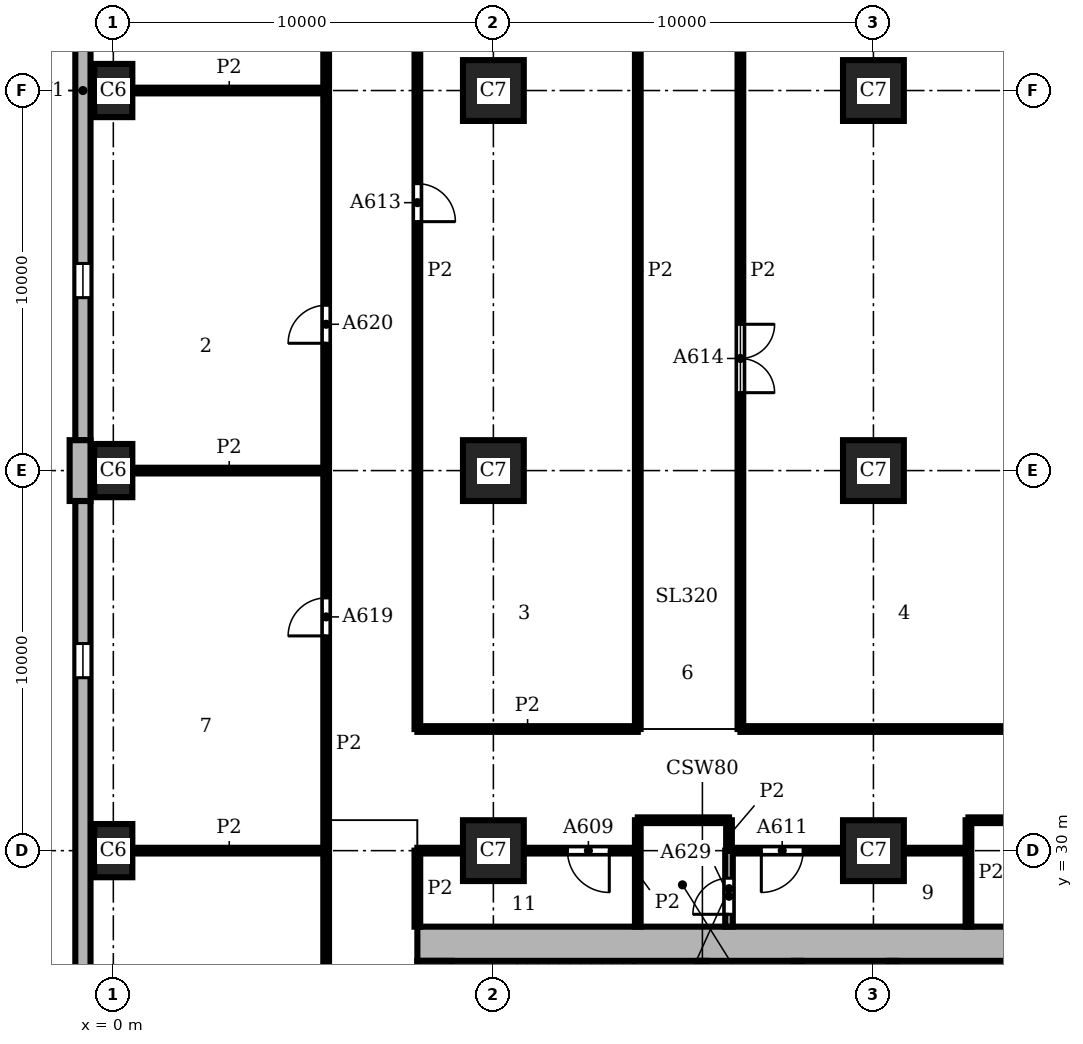
"""IFC4 building model, lengths in metres.
Left out: names, types, materials, properties, quantities, classifications, styles, units other than length and angle.
Written with IfcOpenShell. Run it as: python <this file> out.ifc"""

import sys

from ifc_helpers import new_model, si_unit, direction, frame, frame_2d, origin, origin_2d, place, context, subcontext, project, spatial, polyline, rectangle, outline, extrude, element, fill, save


model = new_model("IFC4")
c1 = context("Model", 3, precision=1e-05, world=origin(), true_north=direction((0.0, 1.0)))
c2 = subcontext(c1, "Body", "Model", "MODEL_VIEW")
j1 = project(units=[si_unit("LENGTHUNIT", "METRE"), si_unit("PLANEANGLEUNIT", "RADIAN")], contexts=[c1])
p1 = place(None, origin())
s1 = spatial("IfcSite", under=j1, at=p1, CompositionType="ELEMENT")
p2 = place(p1, origin())
s2 = spatial("IfcBuilding", under=s1, at=p2, CompositionType="ELEMENT")
p3 = place(p2, frame((0.0, 0.0, 70.5)))
s3 = spatial("IfcBuildingStorey", under=s2, at=p3, CompositionType="ELEMENT", Elevation=70.5)
for number, where, z_axis, x_axis in (
    (1, (0.0, 50.0, 0.0), (0.0, 0.0, 1.0), (0.0, 1.0, 0.0)),
    (2, (0.0, 40.0, 0.0), (0.0, 0.0, 1.0), (0.0, 1.0, 0.0)),
    (3, (0.0, 30.0, 0.0), (0.0, 0.0, 1.0), (0.0, 1.0, 0.0)),
):
    element("IfcColumn", number, at=place(p3, frame(where, z_axis=z_axis, x_axis=x_axis)), inside=s3, PredefinedType="COLUMN", context=c2, shape_type="SweptSolid", body=[
        extrude(rectangle(XDim=1.4, YDim=1.0, at=origin_2d()), origin(), (0.0, 0.0, 1.0), 3.9),
    ])
for number, where, z_axis, x_axis in (
    (4, (10.0, 30.0, 0.0), (0.0, 0.0, 1.0), (1.0, 0.0, 0.0)),
    (5, (10.0, 40.0, 0.0), (0.0, 0.0, 1.0), (1.0, 0.0, 0.0)),
    (6, (10.0, 50.0, 0.0), (0.0, 0.0, 1.0), (1.0, 0.0, 0.0)),
    (7, (20.0, 30.0, 0.0), (0.0, 0.0, 1.0), (1.0, 0.0, 0.0)),
    (8, (20.0, 40.0, 0.0), (0.0, 0.0, 1.0), (1.0, 0.0, 0.0)),
    (9, (20.0, 50.0, 0.0), (0.0, 0.0, 1.0), (1.0, 0.0, 0.0)),
):
    element("IfcColumn", number, at=place(p3, frame(where, z_axis=z_axis, x_axis=x_axis)), inside=s3, PredefinedType="COLUMN", context=c2, shape_type="SweptSolid", body=[
        extrude(rectangle(XDim=1.6, YDim=1.6, at=origin_2d()), origin(), (0.0, 0.0, 1.0), 3.9),
    ])
p4 = place(p3, frame((28.0, 27.55, 0.0), z_axis=(0.0, 0.0, 1.0), x_axis=(-1.0, 0.0, 0.0)))
e10 = element("IfcWall", 10, at=p4, inside=s3, PredefinedType="SHEAR", context=c2, shape_type="SweptSolid", body=[
    extrude(rectangle(XDim=20.0, YDim=0.9, at=frame_2d((10.0, 0.0))), origin(), (0.0, 0.0, 1.0), 3.9),
])
p5 = place(p3, frame((8.45, 27.1, 0.0), z_axis=(0.0, 0.0, 1.0), x_axis=(0.0, -1.0, 0.0)))
e11 = element("IfcWall", 11, at=p5, inside=s3, PredefinedType="SHEAR", context=c2, shape_type="SweptSolid", body=[
    extrude(rectangle(XDim=18.2, YDim=0.9, at=frame_2d((9.1, 0.0))), origin(), (0.0, 0.0, 1.0), 3.9),
])
p6 = place(p3, origin())
e12 = element("IfcWall", 12, at=p6, inside=s3, PredefinedType="SOLIDWALL", context=c2, shape_type="SweptSolid", body=[
    extrude(outline(polyline([(-1.0, 40.8), (-1.15, 40.8), (-1.15, 40.0), (-1.15, 39.2), (-1.0, 39.2), (-0.6, 39.2), (-0.6, 40.0), (-0.6, 40.8), (-1.0, 40.8)])), origin(), (0.0, 0.0, 1.0), 3.9),
])
p7 = place(p3, frame((-0.8, 59.2, 0.0), z_axis=(0.0, 0.0, 1.0), x_axis=(0.0, -1.0, 0.0)))
e13 = element("IfcWall", 13, at=p7, inside=s3, PredefinedType="SOLIDWALL", context=c2, shape_type="SweptSolid", body=[
    extrude(rectangle(XDim=18.4, YDim=0.4, at=frame_2d((9.2, 0.0))), origin(), (0.0, 0.0, 1.0), 3.9),
])
p8 = place(p7, frame((3.75, 0.0, 0.9)))
e14 = element("IfcOpeningElement", 14, at=p8, cuts=e13, PredefinedType="OPENING", context=c2, shape_type="SweptSolid", body=[
    extrude(rectangle(XDim=0.9, YDim=2.35, at=frame_2d((0.45, 1.175))), frame((0.0, 0.21, 0.0), z_axis=(0.0, -1.0, 0.0), x_axis=(1.0, 0.0, 0.0)), (0.0, 0.0, 1.0), 0.42),
])
p9 = place(p7, frame((13.75, 0.0, 0.9)))
e15 = element("IfcOpeningElement", 15, at=p9, cuts=e13, PredefinedType="OPENING", context=c2, shape_type="SweptSolid", body=[
    extrude(rectangle(XDim=0.9, YDim=2.35, at=frame_2d((0.45, 1.175))), frame((0.0, 0.21, 0.0), z_axis=(0.0, -1.0, 0.0), x_axis=(1.0, 0.0, 0.0)), (0.0, 0.0, 1.0), 0.42),
])
p10 = place(p3, frame((-0.8, 39.2, 0.0), z_axis=(0.0, 0.0, 1.0), x_axis=(0.0, -1.0, 0.0)))
e16 = element("IfcWall", 16, at=p10, inside=s3, PredefinedType="SOLIDWALL", context=c2, shape_type="SweptSolid", body=[
    extrude(rectangle(XDim=18.4, YDim=0.4, at=frame_2d((9.2, 0.0))), origin(), (0.0, 0.0, 1.0), 3.9),
])
p11 = place(p10, frame((3.75, 0.0, 0.9)))
e17 = element("IfcOpeningElement", 17, at=p11, cuts=e16, PredefinedType="OPENING", context=c2, shape_type="SweptSolid", body=[
    extrude(rectangle(XDim=0.9, YDim=2.35, at=frame_2d((0.45, 1.175))), frame((0.0, 0.21, 0.0), z_axis=(0.0, -1.0, 0.0), x_axis=(1.0, 0.0, 0.0)), (0.0, 0.0, 1.0), 0.42),
])
p12 = place(p10, frame((13.75, 0.0, 0.9)))
e18 = element("IfcOpeningElement", 18, at=p12, cuts=e16, PredefinedType="OPENING", context=c2, shape_type="SweptSolid", body=[
    extrude(rectangle(XDim=0.9, YDim=2.35, at=frame_2d((0.45, 1.175))), frame((0.0, 0.21, 0.0), z_axis=(0.0, -1.0, 0.0), x_axis=(1.0, 0.0, 0.0)), (0.0, 0.0, 1.0), 0.42),
])
p13 = place(p3, frame((15.5, 23.6, 0.0), z_axis=(0.0, 0.0, 1.0), x_axis=(0.0, 1.0, 0.0)))
e19 = element("IfcWall", 19, at=p13, inside=s3, PredefinedType="SHEAR", context=c2, shape_type="SweptSolid", body=[
    extrude(rectangle(XDim=3.5, YDim=0.2, at=frame_2d((1.75, 0.0))), origin(), (0.0, 0.0, 1.0), 3.58),
])
p14 = place(p3, frame((18.0, 20.0, 0.0), z_axis=(0.0, 0.0, 1.0), x_axis=(0.0, 1.0, 0.0)))
e20 = element("IfcWall", 20, at=p14, inside=s3, PredefinedType="SHEAR", context=c2, shape_type="SweptSolid", body=[
    extrude(rectangle(XDim=7.1, YDim=0.2, at=frame_2d((3.55, 0.0))), origin(), (0.0, 0.0, 1.0), 3.58),
])
p15 = place(p14, frame((1.2, 0.0, 0.0)))
e21 = element("IfcOpeningElement", 21, at=p15, cuts=e20, PredefinedType="OPENING", context=c2, shape_type="SweptSolid", body=[
    extrude(rectangle(XDim=1.2, YDim=2.1, at=frame_2d((0.6, 1.05))), frame((0.0, 0.11, 0.0), z_axis=(0.0, -1.0, 0.0), x_axis=(1.0, 0.0, 0.0)), (0.0, 0.0, 1.0), 0.22),
])
p16 = place(p3, frame((20.5, 23.6, 0.0), z_axis=(0.0, 0.0, 1.0), x_axis=(0.0, 1.0, 0.0)))
e22 = element("IfcWall", 22, at=p16, inside=s3, PredefinedType="SHEAR", context=c2, shape_type="SweptSolid", body=[
    extrude(rectangle(XDim=3.5, YDim=0.2, at=frame_2d((1.75, 0.0))), origin(), (0.0, 0.0, 1.0), 3.58),
])
p17 = place(p3, frame((5.6, 5.6, 0.0), z_axis=(0.0, 0.0, 1.0), x_axis=(0.0, 1.0, 0.0)))
e23 = element("IfcWall", 23, at=p17, inside=s3, PredefinedType="PARTITIONING", context=c2, shape_type="SweptSolid", body=[
    extrude(rectangle(XDim=54.4, YDim=0.15, at=frame_2d((27.2, 0.0))), origin(), (0.0, 0.0, 1.0), 3.58),
])
p18 = place(p17, frame((4.5, 0.0, 0.0)))
e24 = element("IfcOpeningElement", 24, at=p18, cuts=e23, PredefinedType="OPENING", context=c2, shape_type="SweptSolid", body=[
    extrude(rectangle(XDim=1.0, YDim=2.1, at=frame_2d((0.5, 1.05))), frame((0.0, 0.085, 0.0), z_axis=(0.0, -1.0, 0.0), x_axis=(1.0, 0.0, 0.0)), (0.0, 0.0, 1.0), 0.17),
])
p19 = place(p17, frame((11.25, 0.0, 0.0)))
e25 = element("IfcOpeningElement", 25, at=p19, cuts=e23, PredefinedType="OPENING", context=c2, shape_type="SweptSolid", body=[
    extrude(rectangle(XDim=0.8, YDim=2.1, at=frame_2d((0.4, 1.05))), frame((0.0, 0.085, 0.0), z_axis=(0.0, -1.0, 0.0), x_axis=(1.0, 0.0, 0.0)), (0.0, 0.0, 1.0), 0.17),
])
p20 = place(p17, frame((17.5, 0.0, 0.0)))
e26 = element("IfcOpeningElement", 26, at=p20, cuts=e23, PredefinedType="OPENING", context=c2, shape_type="SweptSolid", body=[
    extrude(rectangle(XDim=1.0, YDim=2.1, at=frame_2d((0.5, 1.05))), frame((0.0, 0.085, 0.0), z_axis=(0.0, -1.0, 0.0), x_axis=(1.0, 0.0, 0.0)), (0.0, 0.0, 1.0), 0.17),
])
p21 = place(p17, frame((30.05, 0.0, 0.0)))
e27 = element("IfcOpeningElement", 27, at=p21, cuts=e23, PredefinedType="OPENING", context=c2, shape_type="SweptSolid", body=[
    extrude(rectangle(XDim=1.0, YDim=2.1, at=frame_2d((0.5, 1.05))), frame((0.0, 0.085, 0.0), z_axis=(0.0, -1.0, 0.0), x_axis=(1.0, 0.0, 0.0)), (0.0, 0.0, 1.0), 0.17),
])
p22 = place(p17, frame((37.75, 0.0, 0.0)))
e28 = element("IfcOpeningElement", 28, at=p22, cuts=e23, PredefinedType="OPENING", context=c2, shape_type="SweptSolid", body=[
    extrude(rectangle(XDim=1.0, YDim=2.1, at=frame_2d((0.5, 1.05))), frame((0.0, 0.085, 0.0), z_axis=(0.0, -1.0, 0.0), x_axis=(1.0, 0.0, 0.0)), (0.0, 0.0, 1.0), 0.17),
])
p23 = place(p17, frame((48.25, 0.0, 0.0)))
e29 = element("IfcOpeningElement", 29, at=p23, cuts=e23, PredefinedType="OPENING", context=c2, shape_type="SweptSolid", body=[
    extrude(rectangle(XDim=1.0, YDim=2.1, at=frame_2d((0.5, 1.05))), frame((0.0, 0.085, 0.0), z_axis=(0.0, -1.0, 0.0), x_axis=(1.0, 0.0, 0.0)), (0.0, 0.0, 1.0), 0.17),
])
p24 = place(p3, frame((8.0, 28.0, 0.0), z_axis=(0.0, 0.0, 1.0), x_axis=(0.0, 1.0, 0.0)))
e30 = element("IfcWall", 30, at=p24, inside=s3, PredefinedType="PARTITIONING", context=c2, shape_type="SweptSolid", body=[
    extrude(rectangle(XDim=2.0, YDim=0.15, at=frame_2d((1.0, 0.0))), origin(), (0.0, 0.0, 1.0), 3.58),
])
p25 = place(p3, frame((8.0, 33.2, 0.0), z_axis=(0.0, 0.0, 1.0), x_axis=(0.0, 1.0, 0.0)))
e31 = element("IfcWall", 31, at=p25, inside=s3, PredefinedType="PARTITIONING", context=c2, shape_type="SweptSolid", body=[
    extrude(rectangle(XDim=24.1, YDim=0.15, at=frame_2d((12.05, 0.0))), origin(), (0.0, 0.0, 1.0), 3.58),
])
p26 = place(p25, frame((13.35, 0.0, 0.0)))
e32 = element("IfcOpeningElement", 32, at=p26, cuts=e31, PredefinedType="OPENING", context=c2, shape_type="SweptSolid", body=[
    extrude(rectangle(XDim=1.0, YDim=2.1, at=frame_2d((0.5, 1.05))), frame((0.0, 0.085, 0.0), z_axis=(0.0, -1.0, 0.0), x_axis=(1.0, 0.0, 0.0)), (0.0, 0.0, 1.0), 0.17),
])
p27 = place(p3, frame((13.8, 28.0, 0.0), z_axis=(0.0, 0.0, 1.0), x_axis=(0.0, 1.0, 0.0)))
e33 = element("IfcWall", 33, at=p27, inside=s3, PredefinedType="PARTITIONING", context=c2, shape_type="SweptSolid", body=[
    extrude(rectangle(XDim=2.8, YDim=0.15, at=frame_2d((1.4, 0.0))), origin(), (0.0, 0.0, 1.0), 3.58),
])
p28 = place(p3, frame((13.8, 33.2, 0.0), z_axis=(0.0, 0.0, 1.0), x_axis=(0.0, 1.0, 0.0)))
e34 = element("IfcWall", 34, at=p28, inside=s3, PredefinedType="PARTITIONING", context=c2, shape_type="SweptSolid", body=[
    extrude(rectangle(XDim=24.1, YDim=0.15, at=frame_2d((12.05, 0.0))), origin(), (0.0, 0.0, 1.0), 3.58),
])
p29 = place(p3, frame((16.2, 30.0, 0.0), z_axis=(0.0, 0.0, 1.0), x_axis=(0.0, 1.0, 0.0)))
e35 = element("IfcWall", 35, at=p29, inside=s3, PredefinedType="PARTITIONING", context=c2, shape_type="SweptSolid", body=[
    extrude(rectangle(XDim=0.8, YDim=0.15, at=frame_2d((0.4, 0.0))), origin(), (0.0, 0.0, 1.0), 3.58),
])
p30 = place(p3, frame((16.5, 33.2, 0.0), z_axis=(0.0, 0.0, 1.0), x_axis=(0.0, 1.0, 0.0)))
e36 = element("IfcWall", 36, at=p30, inside=s3, PredefinedType="PARTITIONING", context=c2, shape_type="SweptSolid", body=[
    extrude(rectangle(XDim=24.1, YDim=0.15, at=frame_2d((12.05, 0.0))), origin(), (0.0, 0.0, 1.0), 3.58),
])
p31 = place(p30, frame((8.85, 0.0, 0.0)))
e37 = element("IfcOpeningElement", 37, at=p31, cuts=e36, PredefinedType="OPENING", context=c2, shape_type="SweptSolid", body=[
    extrude(rectangle(XDim=1.8, YDim=2.1, at=frame_2d((0.9, 1.05))), frame((0.0, 0.085, 0.0), z_axis=(0.0, -1.0, 0.0), x_axis=(1.0, 0.0, 0.0)), (0.0, 0.0, 1.0), 0.17),
])
p32 = place(p3, frame((22.5, 28.0, 0.0), z_axis=(0.0, 0.0, 1.0), x_axis=(0.0, 1.0, 0.0)))
e38 = element("IfcWall", 38, at=p32, inside=s3, PredefinedType="PARTITIONING", context=c2, shape_type="SweptSolid", body=[
    extrude(rectangle(XDim=2.8, YDim=0.15, at=frame_2d((1.4, 0.0))), origin(), (0.0, 0.0, 1.0), 3.58),
])
p33 = place(p3, frame((0.5, 30.0, 0.0), z_axis=(0.0, 0.0, 1.0), x_axis=(1.0, 0.0, 0.0)))
e39 = element("IfcWall", 39, at=p33, inside=s3, PredefinedType="PARTITIONING", context=c2, shape_type="SweptSolid", body=[
    extrude(rectangle(XDim=5.1, YDim=0.15, at=frame_2d((2.55, 0.0))), origin(), (0.0, 0.0, 1.0), 3.58),
])
p34 = place(p3, frame((8.0, 30.0, 0.0), z_axis=(0.0, 0.0, 1.0), x_axis=(1.0, 0.0, 0.0)))
e40 = element("IfcWall", 40, at=p34, inside=s3, PredefinedType="PARTITIONING", context=c2, shape_type="SweptSolid", body=[
    extrude(rectangle(XDim=1.2, YDim=0.15, at=frame_2d((0.6, 0.0))), origin(), (0.0, 0.0, 1.0), 3.58),
])
p35 = place(p3, frame((10.8, 30.0, 0.0), z_axis=(0.0, 0.0, 1.0), x_axis=(1.0, 0.0, 0.0)))
e41 = element("IfcWall", 41, at=p35, inside=s3, PredefinedType="PARTITIONING", context=c2, shape_type="SweptSolid", body=[
    extrude(rectangle(XDim=3.0, YDim=0.15, at=frame_2d((1.5, 0.0))), origin(), (0.0, 0.0, 1.0), 3.58),
])
p36 = place(p35, frame((1.15, 0.0, 0.0)))
e42 = element("IfcOpeningElement", 42, at=p36, cuts=e41, PredefinedType="OPENING", context=c2, shape_type="SweptSolid", body=[
    extrude(rectangle(XDim=1.1, YDim=2.1, at=frame_2d((0.55, 1.05))), frame((0.0, 0.085, 0.0), z_axis=(0.0, -1.0, 0.0), x_axis=(1.0, 0.0, 0.0)), (0.0, 0.0, 1.0), 0.17),
])
p37 = place(p3, frame((16.2, 30.0, 0.0), z_axis=(0.0, 0.0, 1.0), x_axis=(1.0, 0.0, 0.0)))
e43 = element("IfcWall", 43, at=p37, inside=s3, PredefinedType="PARTITIONING", context=c2, shape_type="SweptSolid", body=[
    extrude(rectangle(XDim=3.0, YDim=0.15, at=frame_2d((1.5, 0.0))), origin(), (0.0, 0.0, 1.0), 3.58),
])
p38 = place(p37, frame((0.85, 0.0, 0.0)))
e44 = element("IfcOpeningElement", 44, at=p38, cuts=e43, PredefinedType="OPENING", context=c2, shape_type="SweptSolid", body=[
    extrude(rectangle(XDim=1.1, YDim=2.1, at=frame_2d((0.55, 1.05))), frame((0.0, 0.085, 0.0), z_axis=(0.0, -1.0, 0.0), x_axis=(1.0, 0.0, 0.0)), (0.0, 0.0, 1.0), 0.17),
])
p39 = place(p3, frame((20.8, 30.0, 0.0), z_axis=(0.0, 0.0, 1.0), x_axis=(1.0, 0.0, 0.0)))
e45 = element("IfcWall", 45, at=p39, inside=s3, PredefinedType="PARTITIONING", context=c2, shape_type="SweptSolid", body=[
    extrude(rectangle(XDim=1.7, YDim=0.15, at=frame_2d((0.85, 0.0))), origin(), (0.0, 0.0, 1.0), 3.58),
])
p40 = place(p3, frame((13.8, 30.8, 0.0), z_axis=(0.0, 0.0, 1.0), x_axis=(1.0, 0.0, 0.0)))
e46 = element("IfcWall", 46, at=p40, inside=s3, PredefinedType="PARTITIONING", context=c2, shape_type="SweptSolid", body=[
    extrude(rectangle(XDim=2.4, YDim=0.15, at=frame_2d((1.2, 0.0))), origin(), (0.0, 0.0, 1.0), 3.58),
])
p41 = place(p3, frame((22.5, 30.8, 0.0), z_axis=(0.0, 0.0, 1.0), x_axis=(1.0, 0.0, 0.0)))
e47 = element("IfcWall", 47, at=p41, inside=s3, PredefinedType="PARTITIONING", context=c2, shape_type="SweptSolid", body=[
    extrude(rectangle(XDim=6.7, YDim=0.15, at=frame_2d((3.35, 0.0))), origin(), (0.0, 0.0, 1.0), 3.58),
])
p42 = place(p41, frame((2.1, 0.0, 0.0)))
e48 = element("IfcOpeningElement", 48, at=p42, cuts=e47, PredefinedType="OPENING", context=c2, shape_type="SweptSolid", body=[
    extrude(rectangle(XDim=1.1, YDim=2.1, at=frame_2d((0.55, 1.05))), frame((0.0, 0.085, 0.0), z_axis=(0.0, -1.0, 0.0), x_axis=(1.0, 0.0, 0.0)), (0.0, 0.0, 1.0), 0.17),
])
p43 = place(p3, frame((8.0, 33.2, 0.0), z_axis=(0.0, 0.0, 1.0), x_axis=(1.0, 0.0, 0.0)))
e49 = element("IfcWall", 49, at=p43, inside=s3, PredefinedType="PARTITIONING", context=c2, shape_type="SweptSolid", body=[
    extrude(rectangle(XDim=5.8, YDim=0.15, at=frame_2d((2.9, 0.0))), origin(), (0.0, 0.0, 1.0), 3.58),
])
p44 = place(p3, frame((16.5, 33.2, 0.0), z_axis=(0.0, 0.0, 1.0), x_axis=(1.0, 0.0, 0.0)))
e50 = element("IfcWall", 50, at=p44, inside=s3, PredefinedType="PARTITIONING", context=c2, shape_type="SweptSolid", body=[
    extrude(rectangle(XDim=15.862, YDim=0.15, at=frame_2d((7.931, 0.0))), origin(), (0.0, 0.0, 1.0), 3.58),
])
p45 = place(p44, frame((10.05, 0.0, 0.0)))
e51 = element("IfcOpeningElement", 51, at=p45, cuts=e50, PredefinedType="OPENING", context=c2, shape_type="SweptSolid", body=[
    extrude(rectangle(XDim=1.8, YDim=2.1, at=frame_2d((0.9, 1.05))), frame((0.0, 0.085, 0.0), z_axis=(0.0, -1.0, 0.0), x_axis=(1.0, 0.0, 0.0)), (0.0, 0.0, 1.0), 0.17),
])
p46 = place(p44, frame((14.45, 0.0, 0.0)))
e52 = element("IfcOpeningElement", 52, at=p46, cuts=e50, PredefinedType="OPENING", context=c2, shape_type="SweptSolid", body=[
    extrude(rectangle(XDim=1.0, YDim=2.1, at=frame_2d((0.5, 1.05))), frame((0.0, 0.085, 0.0), z_axis=(0.0, -1.0, 0.0), x_axis=(1.0, 0.0, 0.0)), (0.0, 0.0, 1.0), 0.17),
])
for number, where, z_axis, x_axis in (
    (53, (0.5, 40.0, 0.0), (0.0, 0.0, 1.0), (1.0, 0.0, 0.0)),
    (54, (0.5, 50.0, 0.0), (0.0, 0.0, 1.0), (1.0, 0.0, 0.0)),
):
    element("IfcWall", number, at=place(p3, frame(where, z_axis=z_axis, x_axis=x_axis)), inside=s3, PredefinedType="PARTITIONING", context=c2, shape_type="SweptSolid", body=[
        extrude(rectangle(XDim=5.1, YDim=0.15, at=frame_2d((2.55, 0.0))), origin(), (0.0, 0.0, 1.0), 3.58),
    ])
p47 = place(p3, frame((16.2, 28.0, 0.0), z_axis=(0.0, 0.0, 1.0), x_axis=(0.0, 1.0, 0.0)))
e55 = element("IfcWall", 55, at=p47, inside=s3, PredefinedType="PARTITIONING", context=c2, shape_type="SweptSolid", body=[
    extrude(rectangle(XDim=2.0, YDim=0.2, at=frame_2d((1.0, 0.0))), origin(), (0.0, 0.0, 1.0), 3.58),
])
p48 = place(p47, frame((0.325, 0.0, 0.0)))
e56 = element("IfcOpeningElement", 56, at=p48, cuts=e55, PredefinedType="OPENING", context=c2, shape_type="SweptSolid", body=[
    extrude(rectangle(XDim=0.95, YDim=2.1, at=frame_2d((0.475, 1.05))), frame((0.0, 0.11, 0.0), z_axis=(0.0, -1.0, 0.0), x_axis=(1.0, 0.0, 0.0)), (0.0, 0.0, 1.0), 0.22),
])
p49 = place(p9, origin())
e57 = element("IfcWindow", 57, at=p49, inside=s3, PartitioningType="SINGLE_PANEL", PredefinedType="WINDOW", context=c2, shape_type="SweptSolid", body=[
    extrude(rectangle(XDim=0.9, YDim=2.35, at=frame_2d((0.45, 1.175))), frame((0.0, 0.16, 0.0), z_axis=(0.0, -1.0, 0.0), x_axis=(1.0, 0.0, 0.0)), (0.0, 0.0, 1.0), 0.06),
])
fill(e15, e57)
p50 = place(p11, origin())
e58 = element("IfcWindow", 58, at=p50, inside=s3, PartitioningType="SINGLE_PANEL", PredefinedType="WINDOW", context=c2, shape_type="SweptSolid", body=[
    extrude(rectangle(XDim=0.9, YDim=2.35, at=frame_2d((0.45, 1.175))), frame((0.0, 0.16, 0.0), z_axis=(0.0, -1.0, 0.0), x_axis=(1.0, 0.0, 0.0)), (0.0, 0.0, 1.0), 0.06),
])
fill(e17, e58)
p51 = place(p36, frame((1.1, 0.0, 0.0), z_axis=(0.0, 0.0, 1.0), x_axis=(-1.0, 0.0, 0.0)))
e59 = element("IfcDoor", 59, at=p51, inside=s3, OperationType="SINGLE_SWING_LEFT", PredefinedType="DOOR", context=c2, shape_type="SweptSolid", body=[
    extrude(rectangle(XDim=1.1, YDim=2.1, at=frame_2d((0.55, 1.05))), frame((0.0, 0.025, 0.0), z_axis=(0.0, -1.0, 0.0), x_axis=(1.0, 0.0, 0.0)), (0.0, 0.0, 1.0), 0.05),
])
fill(e42, e59)
p52 = place(p38, frame((1.1, 0.0, 0.0), z_axis=(0.0, 0.0, 1.0), x_axis=(-1.0, 0.0, 0.0)))
e60 = element("IfcDoor", 60, at=p52, inside=s3, OperationType="SINGLE_SWING_RIGHT", PredefinedType="DOOR", context=c2, shape_type="SweptSolid", body=[
    extrude(rectangle(XDim=1.1, YDim=2.1, at=frame_2d((0.55, 1.05))), frame((0.0, 0.025, 0.0), z_axis=(0.0, -1.0, 0.0), x_axis=(1.0, 0.0, 0.0)), (0.0, 0.0, 1.0), 0.05),
])
fill(e44, e60)
p53 = place(p26, frame((1.0, 0.0, 0.0), z_axis=(0.0, 0.0, 1.0), x_axis=(-1.0, 0.0, 0.0)))
e61 = element("IfcDoor", 61, at=p53, inside=s3, OperationType="SINGLE_SWING_RIGHT", PredefinedType="DOOR", context=c2, shape_type="SweptSolid", body=[
    extrude(rectangle(XDim=1.0, YDim=2.1, at=frame_2d((0.5, 1.05))), frame((0.0, 0.025, 0.0), z_axis=(0.0, -1.0, 0.0), x_axis=(1.0, 0.0, 0.0)), (0.0, 0.0, 1.0), 0.05),
])
fill(e32, e61)
p54 = place(p31, frame((1.8, 0.0, 0.0), z_axis=(0.0, 0.0, 1.0), x_axis=(-1.0, 0.0, 0.0)))
e62 = element("IfcDoor", 62, at=p54, inside=s3, OperationType="DOUBLE_DOOR_SINGLE_SWING", PredefinedType="DOOR", context=c2, shape_type="SweptSolid", body=[
    extrude(rectangle(XDim=1.8, YDim=2.1, at=frame_2d((0.9, 1.05))), frame((0.0, 0.025, 0.0), z_axis=(0.0, -1.0, 0.0), x_axis=(1.0, 0.0, 0.0)), (0.0, 0.0, 1.0), 0.05),
])
fill(e37, e62)
p55 = place(p21, origin())
e63 = element("IfcDoor", 63, at=p55, inside=s3, OperationType="SINGLE_SWING_LEFT", PredefinedType="DOOR", context=c2, shape_type="SweptSolid", body=[
    extrude(rectangle(XDim=1.0, YDim=2.1, at=frame_2d((0.5, 1.05))), frame((0.0, 0.025, 0.0), z_axis=(0.0, -1.0, 0.0), x_axis=(1.0, 0.0, 0.0)), (0.0, 0.0, 1.0), 0.05),
])
fill(e27, e63)
p56 = place(p22, origin())
e64 = element("IfcDoor", 64, at=p56, inside=s3, OperationType="SINGLE_SWING_LEFT", PredefinedType="DOOR", context=c2, shape_type="SweptSolid", body=[
    extrude(rectangle(XDim=1.0, YDim=2.1, at=frame_2d((0.5, 1.05))), frame((0.0, 0.025, 0.0), z_axis=(0.0, -1.0, 0.0), x_axis=(1.0, 0.0, 0.0)), (0.0, 0.0, 1.0), 0.05),
])
fill(e28, e64)
p57 = place(p48, origin())
e65 = element("IfcDoor", 65, at=p57, inside=s3, OperationType="SINGLE_SWING_LEFT", PredefinedType="DOOR", context=c2, shape_type="SweptSolid", body=[
    extrude(rectangle(XDim=0.95, YDim=2.1, at=frame_2d((0.475, 1.05))), frame((0.0, 0.025, 0.0), z_axis=(0.0, -1.0, 0.0), x_axis=(1.0, 0.0, 0.0)), (0.0, 0.0, 1.0), 0.05),
])
fill(e56, e65)
save(model, sys.argv[1])
